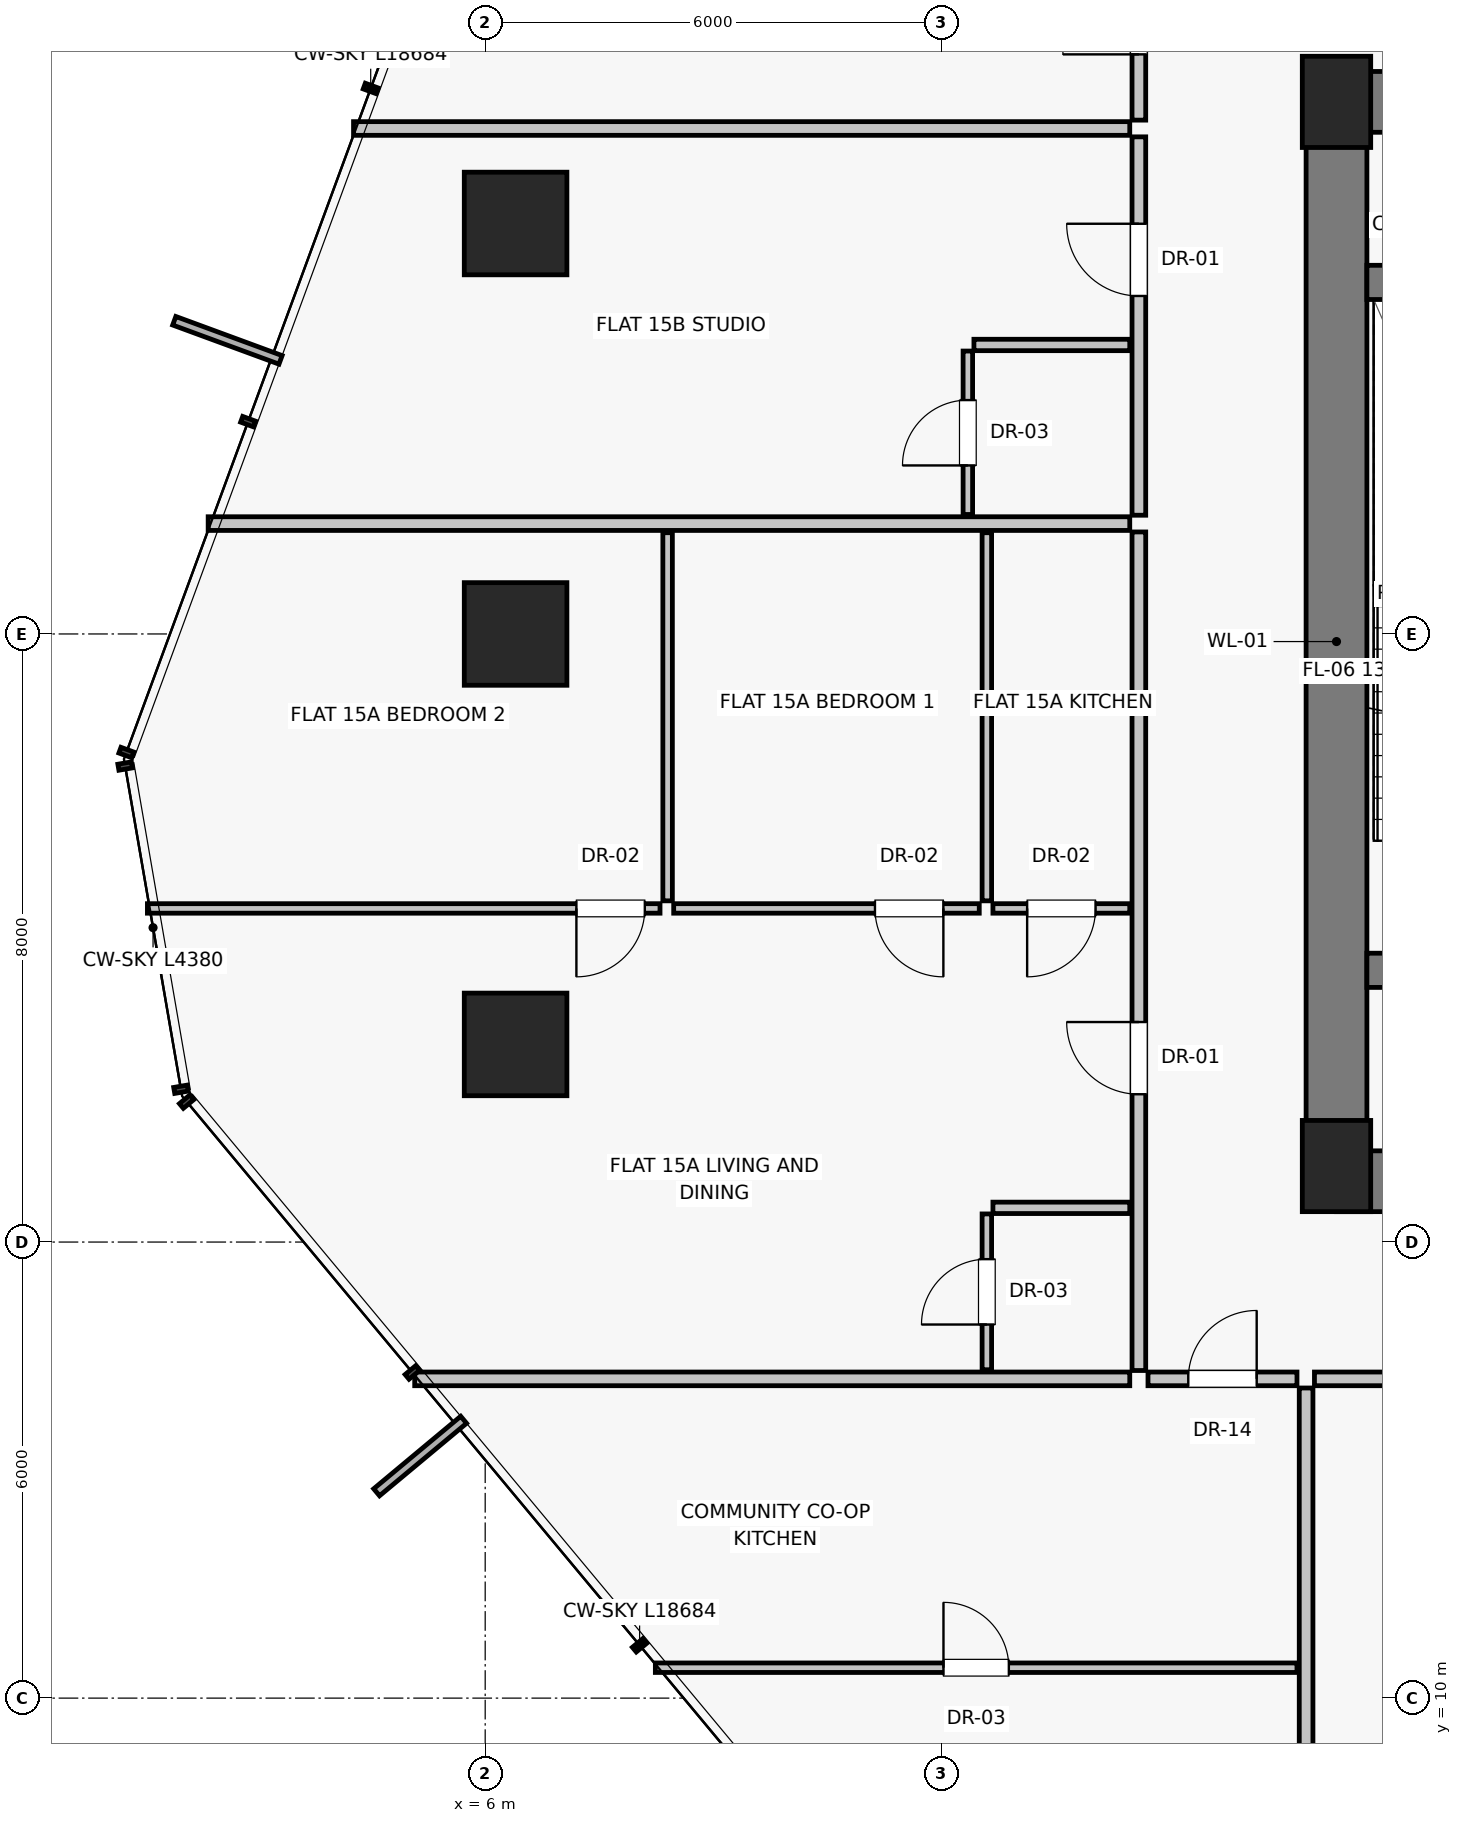
"""IFC4 building model, lengths in metres.
Left out: names, types, materials, properties, quantities, classifications, styles, units other than length and angle.
Written with IfcOpenShell. Run it as: python <this file> out.ifc"""

import sys

from ifc_helpers import new_model, si_unit, direction, frame, frame_2d, origin, origin_2d, place, context, subcontext, project, spatial, rectangle, extrude, source, transform, mapped, element, fill, save


model = new_model("IFC4")
c1 = context("Model", 3, precision=1e-05, world=origin(), true_north=direction((0.0, 1.0)))
c2 = subcontext(c1, "Body", "Model", "MODEL_VIEW")
j1 = project(units=[si_unit("LENGTHUNIT", "METRE"), si_unit("PLANEANGLEUNIT", "RADIAN")], contexts=[c1])
p1 = place(None, origin())
s1 = spatial("IfcSite", under=j1, at=p1, CompositionType="ELEMENT")
p2 = place(p1, origin())
s2 = spatial("IfcBuilding", under=s1, at=p2, CompositionType="ELEMENT")
p3 = place(p2, frame((0.0, 0.0, 56.55)))
s3 = spatial("IfcBuildingStorey", under=s2, at=p3, CompositionType="ELEMENT", Elevation=56.55)
for number, where, z_axis, x_axis in (
    (1, (17.2, 17.0, 0.0), (0.0, 0.0, 1.0), (1.0, 0.0, 0.0)),
    (2, (17.2, 31.0, 0.0), (0.0, 0.0, 1.0), (1.0, 0.0, 0.0)),
):
    element("IfcColumn", number, at=place(p3, frame(where, z_axis=z_axis, x_axis=x_axis)), inside=s3, PredefinedType="PILASTER", context=c2, shape_type="SweptSolid", body=[
        extrude(rectangle(XDim=0.9, YDim=1.2, at=origin_2d()), origin(), (0.0, 0.0, 1.0), 4.3),
    ])
for number, where, z_axis, x_axis in (
    (3, (6.4, 29.4, 0.0), (0.0, 0.0, 1.0), (1.0, 0.0, 0.0)),
    (4, (6.4, 24.0, 0.0), (0.0, 0.0, 1.0), (1.0, 0.0, 0.0)),
    (5, (6.4, 18.6, 0.0), (0.0, 0.0, 1.0), (1.0, 0.0, 0.0)),
):
    element("IfcColumn", number, at=place(p3, frame(where, z_axis=z_axis, x_axis=x_axis)), inside=s3, PredefinedType="COLUMN", context=c2, shape_type="SweptSolid", body=[
        extrude(rectangle(XDim=1.35, YDim=1.35, at=origin_2d()), origin(), (0.0, 0.0, 1.0), 4.3),
    ])
p4 = place(p3, frame((17.2, 16.8, 0.0), z_axis=(0.0, 0.0, 1.0), x_axis=(0.0, 1.0, 0.0)))
e6 = element("IfcWall", 6, at=p4, inside=s3, PredefinedType="SHEAR", context=c2, shape_type="SweptSolid", body=[
    extrude(rectangle(XDim=14.2, YDim=0.8, at=frame_2d((7.1, 0.0))), origin(), (0.0, 0.0, 1.0), 4.05),
])
p5 = place(p3, frame((17.2, 16.8, 0.0), z_axis=(0.0, 0.0, 1.0), x_axis=(1.0, 0.0, 0.0)))
e7 = element("IfcWall", 7, at=p5, inside=s3, PredefinedType="SHEAR", context=c2, shape_type="SweptSolid", body=[
    extrude(rectangle(XDim=5.85, YDim=0.8, at=frame_2d((2.925, 0.0))), origin(), (0.0, 0.0, 1.0), 4.05),
])
p6 = place(p5, frame((1.15, 0.0, 0.0)))
e8 = element("IfcOpeningElement", 8, at=p6, cuts=e7, PredefinedType="OPENING", context=c2, shape_type="SweptSolid", body=[
    extrude(rectangle(XDim=1.2, YDim=2.03, at=frame_2d((0.6, 1.015))), frame((0.0, 0.41, 0.0), z_axis=(0.0, -1.0, 0.0), x_axis=(1.0, 0.0, 0.0)), (0.0, 0.0, 1.0), 0.82),
])
p7 = place(p3, frame((17.2, 31.0, 0.0), z_axis=(0.0, 0.0, 1.0), x_axis=(1.0, 0.0, 0.0)))
e9 = element("IfcWall", 9, at=p7, inside=s3, PredefinedType="SHEAR", context=c2, shape_type="SweptSolid", body=[
    extrude(rectangle(XDim=3.8, YDim=0.8, at=frame_2d((1.9, 0.0))), origin(), (0.0, 0.0, 1.0), 4.05),
])
p8 = place(p7, frame((1.25, 0.0, 0.0)))
e10 = element("IfcOpeningElement", 10, at=p8, cuts=e9, PredefinedType="OPENING", context=c2, shape_type="SweptSolid", body=[
    extrude(rectangle(XDim=0.86, YDim=2.01, at=frame_2d((0.43, 1.005))), frame((0.0, 0.41, 0.0), z_axis=(0.0, -1.0, 0.0), x_axis=(1.0, 0.0, 0.0)), (0.0, 0.0, 1.0), 0.82),
])
p9 = place(p3, frame((17.6, 19.575, 0.0), z_axis=(0.0, 0.0, 1.0), x_axis=(1.0, 0.0, 0.0)))
e11 = element("IfcWall", 11, at=p9, inside=s3, PredefinedType="SHEAR", context=c2, shape_type="SweptSolid", body=[
    extrude(rectangle(XDim=3.425, YDim=0.45, at=frame_2d((1.712, 0.0))), origin(), (0.0, 0.0, 1.0), 4.05),
])
p10 = place(p9, frame((1.05, 0.0, 0.0)))
e12 = element("IfcOpeningElement", 12, at=p10, cuts=e11, PredefinedType="OPENING", context=c2, shape_type="SweptSolid", body=[
    extrude(rectangle(XDim=1.1, YDim=2.03, at=frame_2d((0.55, 1.015))), frame((0.0, 0.235, 0.0), z_axis=(0.0, -1.0, 0.0), x_axis=(1.0, 0.0, 0.0)), (0.0, 0.0, 1.0), 0.47),
])
p11 = place(p3, frame((17.6, 28.625, 0.0), z_axis=(0.0, 0.0, 1.0), x_axis=(1.0, 0.0, 0.0)))
e13 = element("IfcWall", 13, at=p11, inside=s3, PredefinedType="SHEAR", context=c2, shape_type="SweptSolid", body=[
    extrude(rectangle(XDim=3.425, YDim=0.45, at=frame_2d((1.712, 0.0))), origin(), (0.0, 0.0, 1.0), 4.05),
])
p12 = place(p3, frame((16.8, 14.08, 0.0), z_axis=(0.0, 0.0, 1.0), x_axis=(0.0, -1.0, 0.0)))
e14 = element("IfcWall", 14, at=p12, inside=s3, PredefinedType="PARTITIONING", context=c2, shape_type="SweptSolid", body=[
    extrude(rectangle(XDim=11.652, YDim=0.18, at=frame_2d((5.826, 0.0))), origin(), (0.0, 0.0, 1.0), 4.05),
])
p13 = place(p3, frame((16.91, 14.2, 0.0), z_axis=(0.0, 0.0, 1.0), x_axis=(1.0, 0.0, 0.0)))
e15 = element("IfcWall", 15, at=p13, inside=s3, PredefinedType="PARTITIONING", context=c2, shape_type="SweptSolid", body=[
    extrude(rectangle(XDim=7.988, YDim=0.18, at=frame_2d((3.994, 0.0))), origin(), (0.0, 0.0, 1.0), 4.05),
])
p14 = place(p13, frame((3.094, 0.0, 0.0)))
e16 = element("IfcOpeningElement", 16, at=p14, cuts=e15, PredefinedType="OPENING", context=c2, shape_type="SweptSolid", body=[
    extrude(rectangle(XDim=1.8, YDim=2.25, at=frame_2d((0.9, 1.125))), frame((0.0, 0.1, 0.0), z_axis=(0.0, -1.0, 0.0), x_axis=(1.0, 0.0, 0.0)), (0.0, 0.0, 1.0), 0.2),
])
p15 = place(p3, frame((14.48, 14.2, 0.0), z_axis=(0.0, 0.0, 1.0), x_axis=(-1.0, 0.0, 0.0)))
e17 = element("IfcWall", 17, at=p15, inside=s3, PredefinedType="PARTITIONING", context=c2, shape_type="SweptSolid", body=[
    extrude(rectangle(XDim=9.407, YDim=0.18, at=frame_2d((4.704, 0.0))), origin(), (0.0, 0.0, 1.0), 4.05),
])
p16 = place(p3, frame((14.6, 14.31, 0.0), z_axis=(0.0, 0.0, 1.0), x_axis=(0.0, 1.0, 0.0)))
e18 = element("IfcWall", 18, at=p16, inside=s3, PredefinedType="PARTITIONING", context=c2, shape_type="SweptSolid", body=[
    extrude(rectangle(XDim=11.032, YDim=0.18, at=frame_2d((5.516, 0.0))), origin(), (0.0, 0.0, 1.0), 4.05),
])
p17 = place(p16, frame((3.635, 0.0, 0.0)))
e19 = element("IfcOpeningElement", 19, at=p17, cuts=e18, PredefinedType="OPENING", context=c2, shape_type="SweptSolid", body=[
    extrude(rectangle(XDim=0.95, YDim=2.02, at=frame_2d((0.475, 1.01))), frame((0.0, 0.1, 0.0), z_axis=(0.0, -1.0, 0.0), x_axis=(1.0, 0.0, 0.0)), (0.0, 0.0, 1.0), 0.2),
])
p18 = place(p3, frame((14.48, 16.45, 0.0), z_axis=(0.0, 0.0, 1.0), x_axis=(-1.0, 0.0, 0.0)))
e20 = element("IfcWall", 20, at=p18, inside=s3, PredefinedType="PARTITIONING", context=c2, shape_type="SweptSolid", body=[
    extrude(rectangle(XDim=1.8, YDim=0.15, at=frame_2d((0.9, 0.0))), origin(), (0.0, 0.0, 1.0), 4.05),
])
p19 = place(p3, frame((12.6, 14.32, 0.0), z_axis=(0.0, 0.0, 1.0), x_axis=(0.0, 1.0, 0.0)))
e21 = element("IfcWall", 21, at=p19, inside=s3, PredefinedType="PARTITIONING", context=c2, shape_type="SweptSolid", body=[
    extrude(rectangle(XDim=2.05, YDim=0.125, at=frame_2d((1.025, 0.0))), origin(), (0.0, 0.0, 1.0), 4.05),
])
p20 = place(p19, frame((0.595, 0.0, 0.0)))
e22 = element("IfcOpeningElement", 22, at=p20, cuts=e21, PredefinedType="OPENING", context=c2, shape_type="SweptSolid", body=[
    extrude(rectangle(XDim=0.86, YDim=2.01, at=frame_2d((0.43, 1.005))), frame((0.0, 0.073, 0.0), z_axis=(0.0, -1.0, 0.0), x_axis=(1.0, 0.0, 0.0)), (0.0, 0.0, 1.0), 0.145),
])
p21 = place(p3, frame((14.48, 20.389, 0.0), z_axis=(0.0, 0.0, 1.0), x_axis=(-1.0, 0.0, 0.0)))
e23 = element("IfcWall", 23, at=p21, inside=s3, PredefinedType="PARTITIONING", context=c2, shape_type="SweptSolid", body=[
    extrude(rectangle(XDim=1.8, YDim=0.125, at=frame_2d((0.9, 0.0))), origin(), (0.0, 0.0, 1.0), 4.05),
])
p22 = place(p21, frame((0.45, 0.0, 0.0)))
e24 = element("IfcOpeningElement", 24, at=p22, cuts=e23, PredefinedType="OPENING", context=c2, shape_type="SweptSolid", body=[
    extrude(rectangle(XDim=0.9, YDim=2.01, at=frame_2d((0.45, 1.005))), frame((0.0, 0.073, 0.0), z_axis=(0.0, -1.0, 0.0), x_axis=(1.0, 0.0, 0.0)), (0.0, 0.0, 1.0), 0.145),
])
for number, where, z_axis, x_axis in (
    (25, (12.6, 20.489, 0.0), (0.0, 0.0, 1.0), (0.0, 1.0, 0.0)),
    (26, (8.4, 20.489, 0.0), (0.0, 0.0, 1.0), (0.0, 1.0, 0.0)),
):
    element("IfcWall", number, at=place(p3, frame(where, z_axis=z_axis, x_axis=x_axis)), inside=s3, PredefinedType="PARTITIONING", context=c2, shape_type="SweptSolid", body=[
        extrude(rectangle(XDim=4.843, YDim=0.125, at=frame_2d((2.421, 0.0))), origin(), (0.0, 0.0, 1.0), 4.05),
    ])
p23 = place(p3, frame((12.5, 20.389, 0.0), z_axis=(0.0, 0.0, 1.0), x_axis=(-1.0, 0.0, 0.0)))
e27 = element("IfcWall", 27, at=p23, inside=s3, PredefinedType="PARTITIONING", context=c2, shape_type="SweptSolid", body=[
    extrude(rectangle(XDim=4.02, YDim=0.125, at=frame_2d((2.01, 0.0))), origin(), (0.0, 0.0, 1.0), 4.05),
])
p24 = place(p23, frame((0.472, 0.0, 0.0)))
e28 = element("IfcOpeningElement", 28, at=p24, cuts=e27, PredefinedType="OPENING", context=c2, shape_type="SweptSolid", body=[
    extrude(rectangle(XDim=0.9, YDim=2.01, at=frame_2d((0.45, 1.005))), frame((0.0, 0.073, 0.0), z_axis=(0.0, -1.0, 0.0), x_axis=(1.0, 0.0, 0.0)), (0.0, 0.0, 1.0), 0.145),
])
p25 = place(p3, frame((8.3, 20.389, 0.0), z_axis=(0.0, 0.0, 1.0), x_axis=(-1.0, 0.0, 0.0)))
e29 = element("IfcWall", 29, at=p25, inside=s3, PredefinedType="PARTITIONING", context=c2, shape_type="SweptSolid", body=[
    extrude(rectangle(XDim=6.744, YDim=0.125, at=frame_2d((3.372, 0.0))), origin(), (0.0, 0.0, 1.0), 4.05),
])
p26 = place(p25, frame((0.2, 0.0, 0.0)))
e30 = element("IfcOpeningElement", 30, at=p26, cuts=e29, PredefinedType="OPENING", context=c2, shape_type="SweptSolid", body=[
    extrude(rectangle(XDim=0.9, YDim=2.01, at=frame_2d((0.45, 1.005))), frame((0.0, 0.073, 0.0), z_axis=(0.0, -1.0, 0.0), x_axis=(1.0, 0.0, 0.0)), (0.0, 0.0, 1.0), 0.145),
])
p27 = place(p3, frame((14.48, 25.452, 0.0), z_axis=(0.0, 0.0, 1.0), x_axis=(-1.0, 0.0, 0.0)))
e31 = element("IfcWall", 31, at=p27, inside=s3, PredefinedType="PARTITIONING", context=c2, shape_type="SweptSolid", body=[
    extrude(rectangle(XDim=12.125, YDim=0.18, at=frame_2d((6.062, 0.0))), origin(), (0.0, 0.0, 1.0), 4.05),
])
p28 = place(p3, frame((14.6, 30.76, 0.0), z_axis=(0.0, 0.0, 1.0), x_axis=(0.0, 1.0, 0.0)))
e32 = element("IfcWall", 32, at=p28, inside=s3, PredefinedType="PARTITIONING", context=c2, shape_type="SweptSolid", body=[
    extrude(rectangle(XDim=2.73, YDim=0.18, at=frame_2d((1.365, 0.0))), origin(), (0.0, 0.0, 1.0), 4.05),
])
p29 = place(p28, frame((0.865, 0.0, 0.0)))
e33 = element("IfcOpeningElement", 33, at=p29, cuts=e32, PredefinedType="OPENING", context=c2, shape_type="SweptSolid", body=[
    extrude(rectangle(XDim=1.0, YDim=2.01, at=frame_2d((0.5, 1.005))), frame((0.0, 0.1, 0.0), z_axis=(0.0, -1.0, 0.0), x_axis=(1.0, 0.0, 0.0)), (0.0, 0.0, 1.0), 0.2),
])
p30 = place(p3, frame((14.48, 30.65, 0.0), z_axis=(0.0, 0.0, 1.0), x_axis=(-1.0, 0.0, 0.0)))
e34 = element("IfcWall", 34, at=p30, inside=s3, PredefinedType="PARTITIONING", context=c2, shape_type="SweptSolid", body=[
    extrude(rectangle(XDim=10.212, YDim=0.18, at=frame_2d((5.106, 0.0))), origin(), (0.0, 0.0, 1.0), 3.271),
])
p31 = place(p3, frame((14.6, 25.562, 0.0), z_axis=(0.0, 0.0, 1.0), x_axis=(0.0, 1.0, 0.0)))
e35 = element("IfcWall", 35, at=p31, inside=s3, PredefinedType="PARTITIONING", context=c2, shape_type="SweptSolid", body=[
    extrude(rectangle(XDim=4.978, YDim=0.18, at=frame_2d((2.489, 0.0))), origin(), (0.0, 0.0, 1.0), 4.05),
])
p32 = place(p31, frame((2.885, 0.0, 0.0)))
e36 = element("IfcOpeningElement", 36, at=p32, cuts=e35, PredefinedType="OPENING", context=c2, shape_type="SweptSolid", body=[
    extrude(rectangle(XDim=0.95, YDim=2.02, at=frame_2d((0.475, 1.01))), frame((0.0, 0.1, 0.0), z_axis=(0.0, -1.0, 0.0), x_axis=(1.0, 0.0, 0.0)), (0.0, 0.0, 1.0), 0.2),
])
p33 = place(p3, frame((14.48, 27.802, 0.0), z_axis=(0.0, 0.0, 1.0), x_axis=(-1.0, 0.0, 0.0)))
e37 = element("IfcWall", 37, at=p33, inside=s3, PredefinedType="PARTITIONING", context=c2, shape_type="SweptSolid", body=[
    extrude(rectangle(XDim=2.05, YDim=0.15, at=frame_2d((1.025, 0.0))), origin(), (0.0, 0.0, 1.0), 4.05),
])
p34 = place(p3, frame((12.35, 25.572, 0.0), z_axis=(0.0, 0.0, 1.0), x_axis=(0.0, 1.0, 0.0)))
e38 = element("IfcWall", 38, at=p34, inside=s3, PredefinedType="PARTITIONING", context=c2, shape_type="SweptSolid", body=[
    extrude(rectangle(XDim=2.15, YDim=0.125, at=frame_2d((1.075, 0.0))), origin(), (0.0, 0.0, 1.0), 4.05),
])
p35 = place(p34, frame((0.645, 0.0, 0.0)))
e39 = element("IfcOpeningElement", 39, at=p35, cuts=e38, PredefinedType="OPENING", context=c2, shape_type="SweptSolid", body=[
    extrude(rectangle(XDim=0.86, YDim=2.01, at=frame_2d((0.43, 1.005))), frame((0.0, 0.073, 0.0), z_axis=(0.0, -1.0, 0.0), x_axis=(1.0, 0.0, 0.0)), (0.0, 0.0, 1.0), 0.145),
])
p36 = place(p3, frame((14.72, 14.2, 0.0), z_axis=(0.0, 0.0, 1.0), x_axis=(1.0, 0.0, 0.0)))
e40 = element("IfcWall", 40, at=p36, inside=s3, PredefinedType="PARTITIONING", context=c2, shape_type="SweptSolid", body=[
    extrude(rectangle(XDim=1.96, YDim=0.18, at=frame_2d((0.98, 0.0))), origin(), (0.0, 0.0, 1.0), 4.05),
])
p37 = place(p36, frame((0.53, 0.0, 0.0)))
e41 = element("IfcOpeningElement", 41, at=p37, cuts=e40, PredefinedType="OPENING", context=c2, shape_type="SweptSolid", body=[
    extrude(rectangle(XDim=0.9, YDim=2.01, at=frame_2d((0.45, 1.005))), frame((0.0, 0.1, 0.0), z_axis=(0.0, -1.0, 0.0), x_axis=(1.0, 0.0, 0.0)), (0.0, 0.0, 1.0), 0.2),
])
p38 = place(p3, frame((8.239, 10.4, 0.0), z_axis=(0.0, 0.0, 1.0), x_axis=(1.0, 0.0, 0.0)))
e42 = element("IfcWall", 42, at=p38, inside=s3, PredefinedType="PARTITIONING", context=c2, shape_type="SweptSolid", body=[
    extrude(rectangle(XDim=8.441, YDim=0.125, at=frame_2d((4.221, 0.0))), origin(), (0.0, 0.0, 1.0), 4.05),
])
p39 = place(p38, frame((3.791, 0.0, 0.0)))
e43 = element("IfcOpeningElement", 43, at=p39, cuts=e42, PredefinedType="OPENING", context=c2, shape_type="SweptSolid", body=[
    extrude(rectangle(XDim=0.86, YDim=2.01, at=frame_2d((0.43, 1.005))), frame((0.0, 0.073, 0.0), z_axis=(0.0, -1.0, 0.0), x_axis=(1.0, 0.0, 0.0)), (0.0, 0.0, 1.0), 0.145),
])
m1 = source(origin(), c2, "Body", "SweptSolid", [
    extrude(rectangle(XDim=0.95, YDim=2.02, at=frame_2d((0.475, 1.01))), frame((0.0, 0.025, 0.0), z_axis=(0.0, -1.0, 0.0), x_axis=(1.0, 0.0, 0.0)), (0.0, 0.0, 1.0), 0.05),
])
p40 = place(p17, origin())
e44 = element("IfcDoor", 44, at=p40, inside=s3, OperationType="SINGLE_SWING_RIGHT", PredefinedType="DOOR", context=c2, shape_type="MappedRepresentation", body=[
    mapped(m1, transform((0.0, 0.0, 0.0), scale=1.0)),
])
fill(e19, e44)
m2 = source(origin(), c2, "Body", "SweptSolid", [
    extrude(rectangle(XDim=0.86, YDim=2.01, at=frame_2d((0.43, 1.005))), frame((0.0, 0.025, 0.0), z_axis=(0.0, -1.0, 0.0), x_axis=(1.0, 0.0, 0.0)), (0.0, 0.0, 1.0), 0.05),
])
p41 = place(p20, origin())
e45 = element("IfcDoor", 45, at=p41, inside=s3, OperationType="SINGLE_SWING_LEFT", PredefinedType="DOOR", context=c2, shape_type="MappedRepresentation", body=[
    mapped(m2, transform((0.0, 0.0, 0.0), scale=1.0)),
])
fill(e22, e45)
m3 = source(origin(), c2, "Body", "SweptSolid", [
    extrude(rectangle(XDim=0.9, YDim=2.01, at=frame_2d((0.45, 1.005))), frame((0.0, 0.025, 0.0), z_axis=(0.0, -1.0, 0.0), x_axis=(1.0, 0.0, 0.0)), (0.0, 0.0, 1.0), 0.05),
])
p42 = place(p22, origin())
e46 = element("IfcDoor", 46, at=p42, inside=s3, OperationType="SINGLE_SWING_RIGHT", PredefinedType="DOOR", context=c2, shape_type="MappedRepresentation", body=[
    mapped(m3, transform((0.0, 0.0, 0.0), scale=1.0)),
])
fill(e24, e46)
p43 = place(p24, origin())
e47 = element("IfcDoor", 47, at=p43, inside=s3, OperationType="SINGLE_SWING_LEFT", PredefinedType="DOOR", context=c2, shape_type="MappedRepresentation", body=[
    mapped(m3, transform((0.0, 0.0, 0.0), scale=1.0)),
])
fill(e28, e47)
p44 = place(p26, origin())
e48 = element("IfcDoor", 48, at=p44, inside=s3, OperationType="SINGLE_SWING_RIGHT", PredefinedType="DOOR", context=c2, shape_type="MappedRepresentation", body=[
    mapped(m3, transform((0.0, 0.0, 0.0), scale=1.0)),
])
fill(e30, e48)
m4 = source(origin(), c2, "Body", "SweptSolid", [
    extrude(rectangle(XDim=1.0, YDim=2.01, at=frame_2d((0.5, 1.005))), frame((0.0, 0.025, 0.0), z_axis=(0.0, -1.0, 0.0), x_axis=(1.0, 0.0, 0.0)), (0.0, 0.0, 1.0), 0.05),
])
p45 = place(p29, origin())
e49 = element("IfcDoor", 49, at=p45, inside=s3, OperationType="SINGLE_SWING_LEFT", PredefinedType="DOOR", context=c2, shape_type="MappedRepresentation", body=[
    mapped(m4, transform((0.0, 0.0, 0.0), scale=1.0)),
])
fill(e33, e49)
p46 = place(p32, origin())
e50 = element("IfcDoor", 50, at=p46, inside=s3, OperationType="SINGLE_SWING_RIGHT", PredefinedType="DOOR", context=c2, shape_type="MappedRepresentation", body=[
    mapped(m1, transform((0.0, 0.0, 0.0), scale=1.0)),
])
fill(e36, e50)
p47 = place(p35, origin())
e51 = element("IfcDoor", 51, at=p47, inside=s3, OperationType="SINGLE_SWING_LEFT", PredefinedType="DOOR", context=c2, shape_type="MappedRepresentation", body=[
    mapped(m2, transform((0.0, 0.0, 0.0), scale=1.0)),
])
fill(e39, e51)
p48 = place(p37, origin())
e52 = element("IfcDoor", 52, at=p48, inside=s3, OperationType="SINGLE_SWING_RIGHT", PredefinedType="DOOR", context=c2, shape_type="MappedRepresentation", body=[
    mapped(m3, transform((0.0, 0.0, 0.0), scale=1.0)),
])
fill(e41, e52)
p49 = place(p39, origin())
e53 = element("IfcDoor", 53, at=p49, inside=s3, OperationType="SINGLE_SWING_LEFT", PredefinedType="DOOR", context=c2, shape_type="MappedRepresentation", body=[
    mapped(m2, transform((0.0, 0.0, 0.0), scale=1.0)),
])
fill(e43, e53)
save(model, sys.argv[1])
